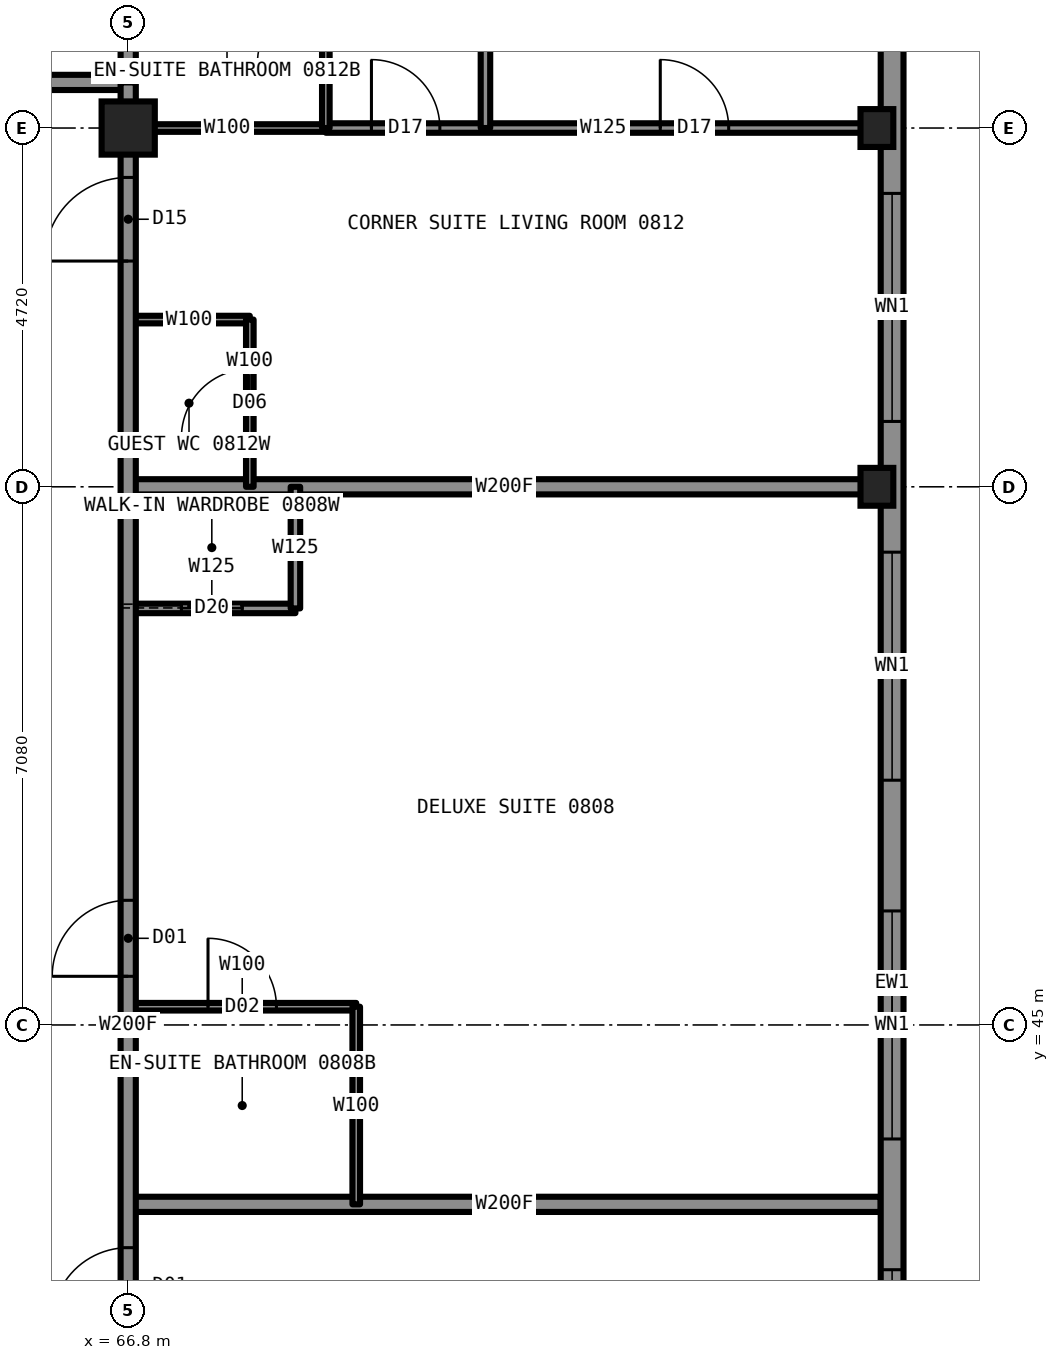
"""IFC4 building model, lengths in metres.
Left out: names, types, materials, properties, quantities, classifications, styles, units other than length and angle.
Written with IfcOpenShell. Run it as: python <this file> out.ifc"""

import sys

from ifc_helpers import new_model, si_unit, direction, frame, frame_2d, origin, origin_2d, place, context, subcontext, project, spatial, rectangle, hollow_rectangle, i_section, extrude, element, fill, save


model = new_model("IFC4")
c1 = context("Model", 3, precision=1e-05, world=origin(), true_north=direction((0.0, 1.0)))
c2 = subcontext(c1, "Body", "Model", "MODEL_VIEW")
j1 = project(units=[si_unit("LENGTHUNIT", "METRE"), si_unit("PLANEANGLEUNIT", "RADIAN")], contexts=[c1])
p1 = place(None, origin())
s1 = spatial("IfcSite", under=j1, at=p1, CompositionType="ELEMENT")
p2 = place(p1, origin())
s2 = spatial("IfcBuilding", under=s1, at=p2, CompositionType="ELEMENT")
p3 = place(p2, frame((0.0, 0.0, 28.5)))
s3 = spatial("IfcBuildingStorey", under=s2, at=p3, CompositionType="ELEMENT", Elevation=28.5)
for number, where, z_axis, x_axis in (
    (1, (76.65, 52.08, 0.0), (0.0, 0.0, 1.0), (1.0, 0.0, 0.0)),
    (2, (76.65, 56.8, 0.0), (0.0, 0.0, 1.0), (1.0, 0.0, 0.0)),
):
    element("IfcColumn", number, at=place(p3, frame(where, z_axis=z_axis, x_axis=x_axis)), inside=s3, PredefinedType="COLUMN", context=c2, shape_type="SweptSolid", body=[
        extrude(i_section(OverallWidth=0.432, OverallDepth=0.498, WebThickness=0.056, FlangeThickness=0.089, at=origin_2d()), origin(), (0.0, 0.0, 1.0), 3.5),
    ])
p4 = place(p3, frame((66.8, 56.8, 0.0), z_axis=(0.0, 0.0, 1.0), x_axis=(1.0, 0.0, 0.0)))
e3 = element("IfcColumn", 3, at=p4, inside=s3, PredefinedType="COLUMN", context=c2, shape_type="SweptSolid", body=[
    extrude(hollow_rectangle(XDim=0.7, YDim=0.7, WallThickness=0.06, at=origin_2d()), origin(), (0.0, 0.0, 1.0), 3.5),
])
p5 = place(p3, frame((66.8, 42.64, 0.0), z_axis=(0.0, 0.0, 1.0), x_axis=(1.0, 0.0, 0.0)))
e4 = element("IfcWall", 4, at=p5, inside=s3, PredefinedType="PARTITIONING", context=c2, shape_type="SweptSolid", body=[
    extrude(rectangle(XDim=9.9, YDim=0.2, at=frame_2d((4.95, 0.0))), origin(), (0.0, 0.0, 1.0), 2.723),
])
p6 = place(p3, frame((66.8, 45.24, 0.0), z_axis=(0.0, 0.0, 1.0), x_axis=(1.0, 0.0, 0.0)))
e5 = element("IfcWall", 5, at=p6, inside=s3, PredefinedType="PARTITIONING", context=c2, shape_type="SweptSolid", body=[
    extrude(rectangle(XDim=3.0, YDim=0.1, at=frame_2d((1.5, 0.0))), origin(), (0.0, 0.0, 1.0), 3.33),
])
p7 = place(p6, frame((1.05, 0.0, 0.0)))
e6 = element("IfcOpeningElement", 6, at=p7, cuts=e5, PredefinedType="OPENING", context=c2, shape_type="SweptSolid", body=[
    extrude(rectangle(XDim=0.9, YDim=2.1, at=frame_2d((0.45, 1.05))), frame((0.0, 0.06, 0.0), z_axis=(0.0, -1.0, 0.0), x_axis=(1.0, 0.0, 0.0)), (0.0, 0.0, 1.0), 0.12),
])
p8 = place(p3, frame((66.8, 56.8, 0.0), z_axis=(0.0, 0.0, 1.0), x_axis=(1.0, 0.0, 0.0)))
e7 = element("IfcWall", 7, at=p8, inside=s3, PredefinedType="PARTITIONING", context=c2, shape_type="SweptSolid", body=[
    extrude(rectangle(XDim=2.6, YDim=0.1, at=frame_2d((1.3, 0.0))), origin(), (0.0, 0.0, 1.0), 2.573),
])
p9 = place(p3, frame((69.4, 56.8, 0.0), z_axis=(0.0, 0.0, 1.0), x_axis=(1.0, 0.0, 0.0)))
e8 = element("IfcWall", 8, at=p9, inside=s3, PredefinedType="PARTITIONING", context=c2, shape_type="SweptSolid", body=[
    extrude(rectangle(XDim=7.3, YDim=0.125, at=frame_2d((3.65, 0.0))), origin(), (0.0, 0.0, 1.0), 2.573),
])
p10 = place(p9, frame((0.6, 0.0, 0.0)))
e9 = element("IfcOpeningElement", 9, at=p10, cuts=e8, PredefinedType="OPENING", context=c2, shape_type="SweptSolid", body=[
    extrude(rectangle(XDim=0.9, YDim=2.2, at=frame_2d((0.45, 1.1))), frame((0.0, 0.073, 0.0), z_axis=(0.0, -1.0, 0.0), x_axis=(1.0, 0.0, 0.0)), (0.0, 0.0, 1.0), 0.145),
])
p11 = place(p9, frame((4.4, 0.0, 0.0)))
e10 = element("IfcOpeningElement", 10, at=p11, cuts=e8, PredefinedType="OPENING", context=c2, shape_type="SweptSolid", body=[
    extrude(rectangle(XDim=0.9, YDim=2.2, at=frame_2d((0.45, 1.1))), frame((0.0, 0.073, 0.0), z_axis=(0.0, -1.0, 0.0), x_axis=(1.0, 0.0, 0.0)), (0.0, 0.0, 1.0), 0.145),
])
p12 = place(p3, frame((43.2, 57.4, 0.0), z_axis=(0.0, 0.0, 1.0), x_axis=(1.0, 0.0, 0.0)))
e11 = element("IfcWall", 11, at=p12, inside=s3, PredefinedType="PARTITIONING", context=c2, shape_type="SweptSolid", body=[
    extrude(rectangle(XDim=23.6, YDim=0.2, at=frame_2d((11.8, 0.0))), origin(), (0.0, 0.0, 1.0), 3.33),
])
p13 = place(p12, frame((1.85, 0.0, 0.0)))
e12 = element("IfcOpeningElement", 12, at=p13, cuts=e11, PredefinedType="OPENING", context=c2, shape_type="SweptSolid", body=[
    extrude(rectangle(XDim=1.1, YDim=2.2, at=frame_2d((0.55, 1.1))), frame((0.0, 0.11, 0.0), z_axis=(0.0, -1.0, 0.0), x_axis=(1.0, 0.0, 0.0)), (0.0, 0.0, 1.0), 0.22),
])
p14 = place(p12, frame((15.62, 0.0, 0.0)))
e13 = element("IfcOpeningElement", 13, at=p14, cuts=e11, PredefinedType="OPENING", context=c2, shape_type="SweptSolid", body=[
    extrude(rectangle(XDim=1.0, YDim=2.2, at=frame_2d((0.5, 1.1))), frame((0.0, 0.11, 0.0), z_axis=(0.0, -1.0, 0.0), x_axis=(1.0, 0.0, 0.0)), (0.0, 0.0, 1.0), 0.22),
])
p15 = place(p12, frame((20.34, 0.0, 0.0)))
e14 = element("IfcOpeningElement", 14, at=p15, cuts=e11, PredefinedType="OPENING", context=c2, shape_type="SweptSolid", body=[
    extrude(rectangle(XDim=1.0, YDim=2.2, at=frame_2d((0.5, 1.1))), frame((0.0, 0.11, 0.0), z_axis=(0.0, -1.0, 0.0), x_axis=(1.0, 0.0, 0.0)), (0.0, 0.0, 1.0), 0.22),
])
p16 = place(p3, frame((66.8, 50.48, 0.0), z_axis=(0.0, 0.0, 1.0), x_axis=(1.0, 0.0, 0.0)))
e15 = element("IfcWall", 15, at=p16, inside=s3, PredefinedType="PARTITIONING", context=c2, shape_type="SweptSolid", body=[
    extrude(rectangle(XDim=2.2, YDim=0.125, at=frame_2d((1.1, 0.0))), origin(), (0.0, 0.0, 1.0), 3.33),
])
p17 = place(p16, frame((0.7, 0.0, 0.0)))
e16 = element("IfcOpeningElement", 16, at=p17, cuts=e15, PredefinedType="OPENING", context=c2, shape_type="SweptSolid", body=[
    extrude(rectangle(XDim=0.8, YDim=2.1, at=frame_2d((0.4, 1.05))), frame((0.0, 0.073, 0.0), z_axis=(0.0, -1.0, 0.0), x_axis=(1.0, 0.0, 0.0)), (0.0, 0.0, 1.0), 0.145),
])
p18 = place(p3, frame((66.8, 52.08, 0.0), z_axis=(0.0, 0.0, 1.0), x_axis=(1.0, 0.0, 0.0)))
e17 = element("IfcWall", 17, at=p18, inside=s3, PredefinedType="PARTITIONING", context=c2, shape_type="SweptSolid", body=[
    extrude(rectangle(XDim=9.9, YDim=0.2, at=frame_2d((4.95, 0.0))), origin(), (0.0, 0.0, 1.0), 2.573),
])
p19 = place(p3, frame((66.8, 54.28, 0.0), z_axis=(0.0, 0.0, 1.0), x_axis=(1.0, 0.0, 0.0)))
e18 = element("IfcWall", 18, at=p19, inside=s3, PredefinedType="PARTITIONING", context=c2, shape_type="SweptSolid", body=[
    extrude(rectangle(XDim=1.6, YDim=0.1, at=frame_2d((0.8, 0.0))), origin(), (0.0, 0.0, 1.0), 2.723),
])
p20 = place(p3, frame((66.8, 33.22, 0.0), z_axis=(0.0, 0.0, 1.0), x_axis=(0.0, 1.0, 0.0)))
e19 = element("IfcWall", 19, at=p20, inside=s3, PredefinedType="PARTITIONING", context=c2, shape_type="SweptSolid", body=[
    extrude(rectangle(XDim=23.56, YDim=0.2, at=frame_2d((11.78, 0.0))), origin(), (0.0, 0.0, 1.0), 3.33),
])
p21 = place(p20, frame((7.85, 0.0, 0.0)))
e20 = element("IfcOpeningElement", 20, at=p21, cuts=e19, PredefinedType="OPENING", context=c2, shape_type="SweptSolid", body=[
    extrude(rectangle(XDim=1.0, YDim=2.2, at=frame_2d((0.5, 1.1))), frame((0.0, 0.11, 0.0), z_axis=(0.0, -1.0, 0.0), x_axis=(1.0, 0.0, 0.0)), (0.0, 0.0, 1.0), 0.22),
])
p22 = place(p20, frame((12.42, 0.0, 0.0)))
e21 = element("IfcOpeningElement", 21, at=p22, cuts=e19, PredefinedType="OPENING", context=c2, shape_type="SweptSolid", body=[
    extrude(rectangle(XDim=1.0, YDim=2.2, at=frame_2d((0.5, 1.1))), frame((0.0, 0.11, 0.0), z_axis=(0.0, -1.0, 0.0), x_axis=(1.0, 0.0, 0.0)), (0.0, 0.0, 1.0), 0.22),
])
p23 = place(p20, frame((21.83, 0.0, 0.0)))
e22 = element("IfcOpeningElement", 22, at=p23, cuts=e19, PredefinedType="OPENING", context=c2, shape_type="SweptSolid", body=[
    extrude(rectangle(XDim=1.1, YDim=2.2, at=frame_2d((0.55, 1.1))), frame((0.0, 0.11, 0.0), z_axis=(0.0, -1.0, 0.0), x_axis=(1.0, 0.0, 0.0)), (0.0, 0.0, 1.0), 0.22),
])
p24 = place(p20, frame((0.63, 0.0, 0.0)))
e23 = element("IfcOpeningElement", 23, at=p24, cuts=e19, PredefinedType="OPENING", context=c2, shape_type="SweptSolid", body=[
    extrude(rectangle(XDim=1.1, YDim=2.2, at=frame_2d((0.55, 1.1))), frame((0.0, 0.11, 0.0), z_axis=(0.0, -1.0, 0.0), x_axis=(1.0, 0.0, 0.0)), (0.0, 0.0, 1.0), 0.22),
])
p25 = place(p3, frame((66.8, 57.4, 0.0), z_axis=(0.0, 0.0, 1.0), x_axis=(0.0, 1.0, 0.0)))
e24 = element("IfcWall", 24, at=p25, inside=s3, PredefinedType="PARTITIONING", context=c2, shape_type="SweptSolid", body=[
    extrude(rectangle(XDim=9.3, YDim=0.2, at=frame_2d((4.65, 0.0))), origin(), (0.0, 0.0, 1.0), 2.573),
])
p26 = place(p3, frame((68.4, 52.08, 0.0), z_axis=(0.0, 0.0, 1.0), x_axis=(0.0, 1.0, 0.0)))
e25 = element("IfcWall", 25, at=p26, inside=s3, PredefinedType="PARTITIONING", context=c2, shape_type="SweptSolid", body=[
    extrude(rectangle(XDim=2.2, YDim=0.1, at=frame_2d((1.1, 0.0))), origin(), (0.0, 0.0, 1.0), 3.33),
])
p27 = place(p26, frame((0.65, 0.0, 0.0)))
e26 = element("IfcOpeningElement", 26, at=p27, cuts=e25, PredefinedType="OPENING", context=c2, shape_type="SweptSolid", body=[
    extrude(rectangle(XDim=0.9, YDim=2.1, at=frame_2d((0.45, 1.05))), frame((0.0, 0.06, 0.0), z_axis=(0.0, -1.0, 0.0), x_axis=(1.0, 0.0, 0.0)), (0.0, 0.0, 1.0), 0.12),
])
p28 = place(p3, frame((69.0, 50.48, 0.0), z_axis=(0.0, 0.0, 1.0), x_axis=(0.0, 1.0, 0.0)))
e27 = element("IfcWall", 27, at=p28, inside=s3, PredefinedType="PARTITIONING", context=c2, shape_type="SweptSolid", body=[
    extrude(rectangle(XDim=1.6, YDim=0.125, at=frame_2d((0.8, 0.0))), origin(), (0.0, 0.0, 1.0), 3.33),
])
p29 = place(p3, frame((69.4, 56.8, 0.0), z_axis=(0.0, 0.0, 1.0), x_axis=(0.0, 1.0, 0.0)))
e28 = element("IfcWall", 28, at=p29, inside=s3, PredefinedType="PARTITIONING", context=c2, shape_type="SweptSolid", body=[
    extrude(rectangle(XDim=2.6, YDim=0.1, at=frame_2d((1.3, 0.0))), origin(), (0.0, 0.0, 1.0), 3.33),
])
p30 = place(p29, frame((0.85, 0.0, 0.0)))
e29 = element("IfcOpeningElement", 29, at=p30, cuts=e28, PredefinedType="OPENING", context=c2, shape_type="SweptSolid", body=[
    extrude(rectangle(XDim=0.9, YDim=2.1, at=frame_2d((0.45, 1.05))), frame((0.0, 0.06, 0.0), z_axis=(0.0, -1.0, 0.0), x_axis=(1.0, 0.0, 0.0)), (0.0, 0.0, 1.0), 0.12),
])
p31 = place(p3, frame((69.8, 42.64, 0.0), z_axis=(0.0, 0.0, 1.0), x_axis=(0.0, 1.0, 0.0)))
e30 = element("IfcWall", 30, at=p31, inside=s3, PredefinedType="PARTITIONING", context=c2, shape_type="SweptSolid", body=[
    extrude(rectangle(XDim=2.6, YDim=0.1, at=frame_2d((1.3, 0.0))), origin(), (0.0, 0.0, 1.0), 3.33),
])
p32 = place(p3, frame((71.5, 56.8, 0.0), z_axis=(0.0, 0.0, 1.0), x_axis=(0.0, 1.0, 0.0)))
e31 = element("IfcWall", 31, at=p32, inside=s3, PredefinedType="PARTITIONING", context=c2, shape_type="SweptSolid", body=[
    extrude(rectangle(XDim=9.894, YDim=0.125, at=frame_2d((4.947, 0.0))), origin(), (0.0, 0.0, 1.0), 3.33),
])
p33 = place(p3, frame((76.85, 28.5, 0.0), z_axis=(0.0, 0.0, 1.0), x_axis=(0.0, 1.0, 0.0)))
e32 = element("IfcWall", 32, at=p33, inside=s3, PredefinedType="SOLIDWALL", context=c2, shape_type="SweptSolid", body=[
    extrude(rectangle(XDim=33.0, YDim=0.3, at=frame_2d((16.5, 0.0))), origin(), (0.0, 0.0, 1.0), 2.83),
])
p34 = place(p33, frame((0.85, 0.0, 0.5)))
e33 = element("IfcOpeningElement", 33, at=p34, cuts=e32, PredefinedType="OPENING", context=c2, shape_type="SweptSolid", body=[
    extrude(rectangle(XDim=3.0, YDim=2.0, at=frame_2d((1.5, 1.0))), frame((0.0, 0.16, 0.0), z_axis=(0.0, -1.0, 0.0), x_axis=(1.0, 0.0, 0.0)), (0.0, 0.0, 1.0), 0.32),
])
p35 = place(p33, frame((5.56, 0.0, 0.5)))
e34 = element("IfcOpeningElement", 34, at=p35, cuts=e32, PredefinedType="OPENING", context=c2, shape_type="SweptSolid", body=[
    extrude(rectangle(XDim=3.0, YDim=2.0, at=frame_2d((1.5, 1.0))), frame((0.0, 0.16, 0.0), z_axis=(0.0, -1.0, 0.0), x_axis=(1.0, 0.0, 0.0)), (0.0, 0.0, 1.0), 0.32),
])
p36 = place(p33, frame((10.28, 0.0, 0.5)))
e35 = element("IfcOpeningElement", 35, at=p36, cuts=e32, PredefinedType="OPENING", context=c2, shape_type="SweptSolid", body=[
    extrude(rectangle(XDim=3.0, YDim=2.0, at=frame_2d((1.5, 1.0))), frame((0.0, 0.16, 0.0), z_axis=(0.0, -1.0, 0.0), x_axis=(1.0, 0.0, 0.0)), (0.0, 0.0, 1.0), 0.32),
])
p37 = place(p33, frame((15.0, 0.0, 0.5)))
e36 = element("IfcOpeningElement", 36, at=p37, cuts=e32, PredefinedType="OPENING", context=c2, shape_type="SweptSolid", body=[
    extrude(rectangle(XDim=3.0, YDim=2.0, at=frame_2d((1.5, 1.0))), frame((0.0, 0.16, 0.0), z_axis=(0.0, -1.0, 0.0), x_axis=(1.0, 0.0, 0.0)), (0.0, 0.0, 1.0), 0.32),
])
p38 = place(p33, frame((19.72, 0.0, 0.5)))
e37 = element("IfcOpeningElement", 37, at=p38, cuts=e32, PredefinedType="OPENING", context=c2, shape_type="SweptSolid", body=[
    extrude(rectangle(XDim=3.0, YDim=2.0, at=frame_2d((1.5, 1.0))), frame((0.0, 0.16, 0.0), z_axis=(0.0, -1.0, 0.0), x_axis=(1.0, 0.0, 0.0)), (0.0, 0.0, 1.0), 0.32),
])
p39 = place(p33, frame((24.44, 0.0, 0.5)))
e38 = element("IfcOpeningElement", 38, at=p39, cuts=e32, PredefinedType="OPENING", context=c2, shape_type="SweptSolid", body=[
    extrude(rectangle(XDim=3.0, YDim=2.0, at=frame_2d((1.5, 1.0))), frame((0.0, 0.16, 0.0), z_axis=(0.0, -1.0, 0.0), x_axis=(1.0, 0.0, 0.0)), (0.0, 0.0, 1.0), 0.32),
])
p40 = place(p33, frame((29.15, 0.0, 0.5)))
e39 = element("IfcOpeningElement", 39, at=p40, cuts=e32, PredefinedType="OPENING", context=c2, shape_type="SweptSolid", body=[
    extrude(rectangle(XDim=3.0, YDim=2.0, at=frame_2d((1.5, 1.0))), frame((0.0, 0.16, 0.0), z_axis=(0.0, -1.0, 0.0), x_axis=(1.0, 0.0, 0.0)), (0.0, 0.0, 1.0), 0.32),
])
p41 = place(p3, frame((66.8, 56.78, 0.0), z_axis=(0.0, 0.0, 1.0), x_axis=(0.0, 1.0, 0.0)))
e40 = element("IfcWall", 40, at=p41, inside=s3, PredefinedType="PARTITIONING", context=c2, shape_type="SweptSolid", body=[
    extrude(rectangle(XDim=0.62, YDim=0.2, at=frame_2d((0.31, 0.0))), origin(), (0.0, 0.0, 1.0), 2.573),
])
p42 = place(p21, origin())
e41 = element("IfcDoor", 41, at=p42, inside=s3, OperationType="SINGLE_SWING_LEFT", PredefinedType="DOOR", context=c2, shape_type="SweptSolid", body=[
    extrude(rectangle(XDim=1.0, YDim=2.2, at=frame_2d((0.5, 1.1))), frame((0.0, 0.025, 0.0), z_axis=(0.0, -1.0, 0.0), x_axis=(1.0, 0.0, 0.0)), (0.0, 0.0, 1.0), 0.05),
])
fill(e20, e41)
p43 = place(p22, origin())
e42 = element("IfcDoor", 42, at=p43, inside=s3, OperationType="SINGLE_SWING_LEFT", PredefinedType="DOOR", context=c2, shape_type="SweptSolid", body=[
    extrude(rectangle(XDim=1.0, YDim=2.2, at=frame_2d((0.5, 1.1))), frame((0.0, 0.025, 0.0), z_axis=(0.0, -1.0, 0.0), x_axis=(1.0, 0.0, 0.0)), (0.0, 0.0, 1.0), 0.05),
])
fill(e21, e42)
p44 = place(p7, origin())
e43 = element("IfcDoor", 43, at=p44, inside=s3, OperationType="SINGLE_SWING_RIGHT", PredefinedType="DOOR", context=c2, shape_type="SweptSolid", body=[
    extrude(rectangle(XDim=0.9, YDim=2.1, at=frame_2d((0.45, 1.05))), frame((0.0, 0.025, 0.0), z_axis=(0.0, -1.0, 0.0), x_axis=(1.0, 0.0, 0.0)), (0.0, 0.0, 1.0), 0.05),
])
fill(e6, e43)
p45 = place(p17, origin())
e44 = element("IfcDoor", 44, at=p45, inside=s3, OperationType="SLIDING_TO_LEFT", PredefinedType="DOOR", context=c2, shape_type="SweptSolid", body=[
    extrude(rectangle(XDim=0.8, YDim=2.1, at=frame_2d((0.4, 1.05))), frame((0.0, 0.025, 0.0), z_axis=(0.0, -1.0, 0.0), x_axis=(1.0, 0.0, 0.0)), (0.0, 0.0, 1.0), 0.05),
])
fill(e16, e44)
p46 = place(p23, origin())
e45 = element("IfcDoor", 45, at=p46, inside=s3, OperationType="SINGLE_SWING_LEFT", PredefinedType="DOOR", context=c2, shape_type="SweptSolid", body=[
    extrude(rectangle(XDim=1.1, YDim=2.2, at=frame_2d((0.55, 1.1))), frame((0.0, 0.025, 0.0), z_axis=(0.0, -1.0, 0.0), x_axis=(1.0, 0.0, 0.0)), (0.0, 0.0, 1.0), 0.05),
])
fill(e22, e45)
p47 = place(p30, origin())
e46 = element("IfcDoor", 46, at=p47, inside=s3, OperationType="SINGLE_SWING_RIGHT", PredefinedType="DOOR", context=c2, shape_type="SweptSolid", body=[
    extrude(rectangle(XDim=0.9, YDim=2.1, at=frame_2d((0.45, 1.05))), frame((0.0, 0.025, 0.0), z_axis=(0.0, -1.0, 0.0), x_axis=(1.0, 0.0, 0.0)), (0.0, 0.0, 1.0), 0.05),
])
fill(e29, e46)
p48 = place(p10, origin())
e47 = element("IfcDoor", 47, at=p48, inside=s3, OperationType="SINGLE_SWING_LEFT", PredefinedType="DOOR", context=c2, shape_type="SweptSolid", body=[
    extrude(rectangle(XDim=0.9, YDim=2.2, at=frame_2d((0.45, 1.1))), frame((0.0, 0.025, 0.0), z_axis=(0.0, -1.0, 0.0), x_axis=(1.0, 0.0, 0.0)), (0.0, 0.0, 1.0), 0.05),
])
fill(e9, e47)
p49 = place(p11, origin())
e48 = element("IfcDoor", 48, at=p49, inside=s3, OperationType="SINGLE_SWING_LEFT", PredefinedType="DOOR", context=c2, shape_type="SweptSolid", body=[
    extrude(rectangle(XDim=0.9, YDim=2.2, at=frame_2d((0.45, 1.1))), frame((0.0, 0.025, 0.0), z_axis=(0.0, -1.0, 0.0), x_axis=(1.0, 0.0, 0.0)), (0.0, 0.0, 1.0), 0.05),
])
fill(e10, e48)
p50 = place(p27, origin())
e49 = element("IfcDoor", 49, at=p50, inside=s3, OperationType="SINGLE_SWING_LEFT", PredefinedType="DOOR", context=c2, shape_type="SweptSolid", body=[
    extrude(rectangle(XDim=0.9, YDim=2.1, at=frame_2d((0.45, 1.05))), frame((0.0, 0.025, 0.0), z_axis=(0.0, -1.0, 0.0), x_axis=(1.0, 0.0, 0.0)), (0.0, 0.0, 1.0), 0.05),
])
fill(e26, e49)
p51 = place(p36, origin())
e50 = element("IfcWindow", 50, at=p51, inside=s3, PartitioningType="SINGLE_PANEL", PredefinedType="WINDOW", context=c2, shape_type="SweptSolid", body=[
    extrude(rectangle(XDim=3.0, YDim=2.0, at=frame_2d((1.5, 1.0))), frame((0.0, 0.03, 0.0), z_axis=(0.0, -1.0, 0.0), x_axis=(1.0, 0.0, 0.0)), (0.0, 0.0, 1.0), 0.06),
])
fill(e35, e50)
p52 = place(p37, origin())
e51 = element("IfcWindow", 51, at=p52, inside=s3, PartitioningType="SINGLE_PANEL", PredefinedType="WINDOW", context=c2, shape_type="SweptSolid", body=[
    extrude(rectangle(XDim=3.0, YDim=2.0, at=frame_2d((1.5, 1.0))), frame((0.0, 0.03, 0.0), z_axis=(0.0, -1.0, 0.0), x_axis=(1.0, 0.0, 0.0)), (0.0, 0.0, 1.0), 0.06),
])
fill(e36, e51)
p53 = place(p38, origin())
e52 = element("IfcWindow", 52, at=p53, inside=s3, PartitioningType="SINGLE_PANEL", PredefinedType="WINDOW", context=c2, shape_type="SweptSolid", body=[
    extrude(rectangle(XDim=3.0, YDim=2.0, at=frame_2d((1.5, 1.0))), frame((0.0, 0.03, 0.0), z_axis=(0.0, -1.0, 0.0), x_axis=(1.0, 0.0, 0.0)), (0.0, 0.0, 1.0), 0.06),
])
fill(e37, e52)
p54 = place(p39, origin())
e53 = element("IfcWindow", 53, at=p54, inside=s3, PartitioningType="SINGLE_PANEL", PredefinedType="WINDOW", context=c2, shape_type="SweptSolid", body=[
    extrude(rectangle(XDim=3.0, YDim=2.0, at=frame_2d((1.5, 1.0))), frame((0.0, 0.03, 0.0), z_axis=(0.0, -1.0, 0.0), x_axis=(1.0, 0.0, 0.0)), (0.0, 0.0, 1.0), 0.06),
])
fill(e38, e53)
p55 = place(p40, origin())
e54 = element("IfcWindow", 54, at=p55, inside=s3, PartitioningType="SINGLE_PANEL", PredefinedType="WINDOW", context=c2, shape_type="SweptSolid", body=[
    extrude(rectangle(XDim=3.0, YDim=2.0, at=frame_2d((1.5, 1.0))), frame((0.0, 0.03, 0.0), z_axis=(0.0, -1.0, 0.0), x_axis=(1.0, 0.0, 0.0)), (0.0, 0.0, 1.0), 0.06),
])
fill(e39, e54)
save(model, sys.argv[1])
